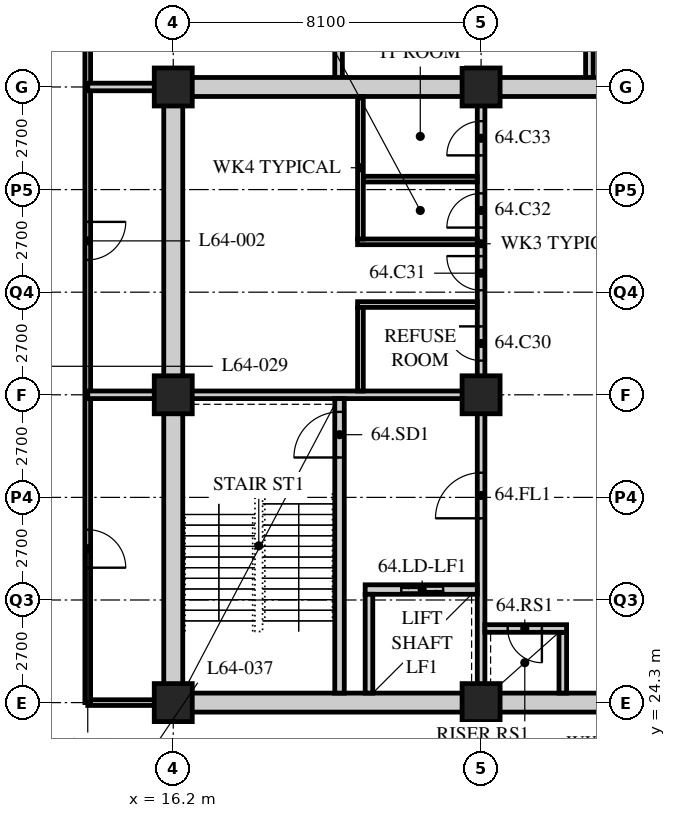
"""IFC4 building model, lengths in metres.
Left out: names, types, materials, properties, quantities, classifications, styles, units other than length and angle.
Written with IfcOpenShell. Run it as: python <this file> out.ifc"""

import sys

from ifc_helpers import new_model, si_unit, direction, frame, frame_2d, origin, origin_2d, place, context, subcontext, project, spatial, rectangle, hollow_rectangle, extrude, element, fill, save


model = new_model("IFC4")
c1 = context("Model", 3, precision=1e-05, world=origin(), true_north=direction((0.0, 1.0)))
c2 = subcontext(c1, "Body", "Model", "MODEL_VIEW")
j1 = project(units=[si_unit("LENGTHUNIT", "METRE"), si_unit("PLANEANGLEUNIT", "RADIAN")], contexts=[c1])
p1 = place(None, origin())
s1 = spatial("IfcSite", under=j1, at=p1, CompositionType="ELEMENT")
p2 = place(p1, origin())
s2 = spatial("IfcBuilding", under=s1, at=p2, CompositionType="ELEMENT")
p3 = place(p2, frame((0.0, 0.0, 250.2)))
s3 = spatial("IfcBuildingStorey", under=s2, at=p3, CompositionType="ELEMENT", Elevation=250.2)
for number, where, z_axis, x_axis in (
    (1, (16.2, 24.3, 0.0), (0.0, 0.0, 1.0), (1.0, 0.0, 0.0)),
    (2, (16.2, 32.4, 0.0), (0.0, 0.0, 1.0), (1.0, 0.0, 0.0)),
    (3, (16.2, 40.5, 0.0), (0.0, 0.0, 1.0), (1.0, 0.0, 0.0)),
    (4, (24.3, 24.3, 0.0), (0.0, 0.0, 1.0), (1.0, 0.0, 0.0)),
    (5, (24.3, 32.4, 0.0), (0.0, 0.0, 1.0), (1.0, 0.0, 0.0)),
    (6, (24.3, 40.5, 0.0), (0.0, 0.0, 1.0), (1.0, 0.0, 0.0)),
):
    element("IfcColumn", number, at=place(p3, frame(where, z_axis=z_axis, x_axis=x_axis)), inside=s3, PredefinedType="COLUMN", context=c2, shape_type="SweptSolid", body=[
        extrude(hollow_rectangle(XDim=1.0, YDim=1.0, WallThickness=0.1, at=origin_2d()), origin(), (0.0, 0.0, 1.0), 3.9),
    ])
p4 = place(p3, frame((16.0, 24.3, 0.0), z_axis=(0.0, 0.0, 1.0), x_axis=(-1.0, 0.0, 0.0)))
e7 = element("IfcWall", 7, at=p4, inside=s3, PredefinedType="PARTITIONING", context=c2, shape_type="SweptSolid", body=[
    extrude(rectangle(XDim=2.05, YDim=0.15, at=frame_2d((1.025, 0.0))), origin(), (0.0, 0.0, 1.0), 3.078),
])
p5 = place(p3, frame((13.95, 24.3, 0.0), z_axis=(0.0, 0.0, 1.0), x_axis=(0.0, 1.0, 0.0)))
e8 = element("IfcWall", 8, at=p5, inside=s3, PredefinedType="PARTITIONING", context=c2, shape_type="SweptSolid", body=[
    extrude(rectangle(XDim=26.55, YDim=0.15, at=frame_2d((13.275, 0.0))), origin(), (0.0, 0.0, 1.0), 3.69),
])
p6 = place(p5, frame((3.55, 0.0, 0.0)))
e9 = element("IfcOpeningElement", 9, at=p6, cuts=e8, PredefinedType="OPENING", context=c2, shape_type="SweptSolid", body=[
    extrude(rectangle(XDim=1.0, YDim=2.1, at=frame_2d((0.5, 1.05))), frame((0.0, 0.085, 0.0), z_axis=(0.0, -1.0, 0.0), x_axis=(1.0, 0.0, 0.0)), (0.0, 0.0, 1.0), 0.17),
])
p7 = place(p5, frame((11.65, 0.0, 0.0)))
e10 = element("IfcOpeningElement", 10, at=p7, cuts=e8, PredefinedType="OPENING", context=c2, shape_type="SweptSolid", body=[
    extrude(rectangle(XDim=1.0, YDim=2.1, at=frame_2d((0.5, 1.05))), frame((0.0, 0.085, 0.0), z_axis=(0.0, -1.0, 0.0), x_axis=(1.0, 0.0, 0.0)), (0.0, 0.0, 1.0), 0.17),
])
p8 = place(p3, frame((13.95, 32.4, 0.0), z_axis=(0.0, 0.0, 1.0), x_axis=(1.0, 0.0, 0.0)))
e11 = element("IfcWall", 11, at=p8, inside=s3, PredefinedType="SOLIDWALL", context=c2, shape_type="SweptSolid", body=[
    extrude(rectangle(XDim=2.25, YDim=0.2, at=frame_2d((1.125, 0.0))), origin(), (0.0, 0.0, 1.0), 3.078),
])
for number, where, z_axis, x_axis in (
    (12, (20.55, 50.85, 0.0), (0.0, 0.0, 1.0), (0.0, -1.0, 0.0)),
    (13, (27.15, 40.5, 0.0), (0.0, 0.0, 1.0), (0.0, 1.0, 0.0)),
):
    element("IfcWall", number, at=place(p3, frame(where, z_axis=z_axis, x_axis=x_axis)), inside=s3, PredefinedType="SOLIDWALL", context=c2, shape_type="SweptSolid", body=[
        extrude(rectangle(XDim=10.35, YDim=0.2, at=frame_2d((5.175, 0.0))), origin(), (0.0, 0.0, 1.0), 3.69),
    ])
p9 = place(p3, frame((13.95, 40.5, 0.0), z_axis=(0.0, 0.0, 1.0), x_axis=(1.0, 0.0, 0.0)))
e14 = element("IfcWall", 14, at=p9, inside=s3, PredefinedType="SOLIDWALL", context=c2, shape_type="SweptSolid", body=[
    extrude(rectangle(XDim=2.25, YDim=0.2, at=frame_2d((1.125, 0.0))), origin(), (0.0, 0.0, 1.0), 3.078),
])
p10 = place(p3, frame((15.95, 24.3, 0.0), z_axis=(0.0, 0.0, 1.0), x_axis=(1.0, 0.0, 0.0)))
e15 = element("IfcWall", 15, at=p10, inside=s3, PredefinedType="SOLIDWALL", context=c2, shape_type="SweptSolid", body=[
    extrude(rectangle(XDim=24.55, YDim=0.5, at=frame_2d((12.275, 0.0))), origin(), (0.0, 0.0, 1.0), 3.04),
])
p11 = place(p10, frame((11.5, 0.0, 0.0)))
e16 = element("IfcOpeningElement", 16, at=p11, cuts=e15, PredefinedType="OPENING", context=c2, shape_type="SweptSolid", body=[
    extrude(rectangle(XDim=1.8, YDim=2.4, at=frame_2d((0.9, 1.2))), frame((0.0, 0.26, 0.0), z_axis=(0.0, -1.0, 0.0), x_axis=(1.0, 0.0, 0.0)), (0.0, 0.0, 1.0), 0.52),
])
p12 = place(p3, frame((15.95, 40.5, 0.0), z_axis=(0.0, 0.0, 1.0), x_axis=(1.0, 0.0, 0.0)))
e17 = element("IfcWall", 17, at=p12, inside=s3, PredefinedType="SOLIDWALL", context=c2, shape_type="SweptSolid", body=[
    extrude(rectangle(XDim=24.55, YDim=0.5, at=frame_2d((12.275, 0.0))), origin(), (0.0, 0.0, 1.0), 3.04),
])
p13 = place(p12, frame((11.5, 0.0, 0.0)))
e18 = element("IfcOpeningElement", 18, at=p13, cuts=e17, PredefinedType="OPENING", context=c2, shape_type="SweptSolid", body=[
    extrude(rectangle(XDim=1.8, YDim=2.4, at=frame_2d((0.9, 1.2))), frame((0.0, 0.26, 0.0), z_axis=(0.0, -1.0, 0.0), x_axis=(1.0, 0.0, 0.0)), (0.0, 0.0, 1.0), 0.52),
])
p14 = place(p3, frame((16.2, 24.55, 0.0), z_axis=(0.0, 0.0, 1.0), x_axis=(0.0, 1.0, 0.0)))
e19 = element("IfcWall", 19, at=p14, inside=s3, PredefinedType="SOLIDWALL", context=c2, shape_type="SweptSolid", body=[
    extrude(rectangle(XDim=15.7, YDim=0.5, at=frame_2d((7.85, 0.0))), origin(), (0.0, 0.0, 1.0), 3.078),
])
p15 = place(p3, frame((16.45, 32.4, 0.0), z_axis=(0.0, 0.0, 1.0), x_axis=(1.0, 0.0, 0.0)))
e20 = element("IfcWall", 20, at=p15, inside=s3, PredefinedType="SOLIDWALL", context=c2, shape_type="SweptSolid", body=[
    extrude(rectangle(XDim=7.95, YDim=0.2, at=frame_2d((3.975, 0.0))), origin(), (0.0, 0.0, 1.0), 3.078),
])
p16 = place(p3, frame((24.3, 24.55, 0.0), z_axis=(0.0, 0.0, 1.0), x_axis=(0.0, 1.0, 0.0)))
e21 = element("IfcWall", 21, at=p16, inside=s3, PredefinedType="SOLIDWALL", context=c2, shape_type="SweptSolid", body=[
    extrude(rectangle(XDim=7.75, YDim=0.2, at=frame_2d((3.875, 0.0))), origin(), (0.0, 0.0, 1.0), 3.078),
])
p17 = place(p16, frame((4.6, 0.0, 0.0)))
e22 = element("IfcOpeningElement", 22, at=p17, cuts=e21, PredefinedType="OPENING", context=c2, shape_type="SweptSolid", body=[
    extrude(rectangle(XDim=1.2, YDim=2.1, at=frame_2d((0.6, 1.05))), frame((0.0, 0.11, 0.0), z_axis=(0.0, -1.0, 0.0), x_axis=(1.0, 0.0, 0.0)), (0.0, 0.0, 1.0), 0.22),
])
p18 = place(p3, frame((20.575, 24.55, 0.0), z_axis=(0.0, 0.0, 1.0), x_axis=(0.0, 1.0, 0.0)))
e23 = element("IfcWall", 23, at=p18, inside=s3, PredefinedType="SOLIDWALL", context=c2, shape_type="SweptSolid", body=[
    extrude(rectangle(XDim=7.75, YDim=0.25, at=frame_2d((3.875, 0.0))), origin(), (0.0, 0.0, 1.0), 3.69),
])
p19 = place(p18, frame((6.2, 0.0, 0.0)))
e24 = element("IfcOpeningElement", 24, at=p19, cuts=e23, PredefinedType="OPENING", context=c2, shape_type="SweptSolid", body=[
    extrude(rectangle(XDim=1.2, YDim=2.1, at=frame_2d((0.6, 1.05))), frame((0.0, 0.135, 0.0), z_axis=(0.0, -1.0, 0.0), x_axis=(1.0, 0.0, 0.0)), (0.0, 0.0, 1.0), 0.27),
])
p20 = place(p3, frame((21.25, 27.275, 0.0), z_axis=(0.0, 0.0, 1.0), x_axis=(1.0, 0.0, 0.0)))
e25 = element("IfcWall", 25, at=p20, inside=s3, PredefinedType="SOLIDWALL", context=c2, shape_type="SweptSolid", body=[
    extrude(rectangle(XDim=2.95, YDim=0.25, at=frame_2d((1.475, 0.0))), origin(), (0.0, 0.0, 1.0), 3.69),
])
p21 = place(p20, frame((0.95, 0.0, 0.0)))
e26 = element("IfcOpeningElement", 26, at=p21, cuts=e25, PredefinedType="OPENING", context=c2, shape_type="SweptSolid", body=[
    extrude(rectangle(XDim=1.1, YDim=2.4, at=frame_2d((0.55, 1.2))), frame((0.0, 0.135, 0.0), z_axis=(0.0, -1.0, 0.0), x_axis=(1.0, 0.0, 0.0)), (0.0, 0.0, 1.0), 0.27),
])
p22 = place(p3, frame((21.35, 24.55, 0.0), z_axis=(0.0, 0.0, 1.0), x_axis=(0.0, 1.0, 0.0)))
e27 = element("IfcWall", 27, at=p22, inside=s3, PredefinedType="SOLIDWALL", context=c2, shape_type="SweptSolid", body=[
    extrude(rectangle(XDim=2.6, YDim=0.2, at=frame_2d((1.3, 0.0))), origin(), (0.0, 0.0, 1.0), 3.69),
])
p23 = place(p3, frame((26.45, 24.55, 0.0), z_axis=(0.0, 0.0, 1.0), x_axis=(0.0, 1.0, 0.0)))
e28 = element("IfcWall", 28, at=p23, inside=s3, PredefinedType="SOLIDWALL", context=c2, shape_type="SweptSolid", body=[
    extrude(rectangle(XDim=1.6, YDim=0.2, at=frame_2d((0.8, 0.0))), origin(), (0.0, 0.0, 1.0), 3.69),
])
p24 = place(p3, frame((24.4, 26.25, 0.0), z_axis=(0.0, 0.0, 1.0), x_axis=(1.0, 0.0, 0.0)))
e29 = element("IfcWall", 29, at=p24, inside=s3, PredefinedType="SOLIDWALL", context=c2, shape_type="SweptSolid", body=[
    extrude(rectangle(XDim=2.15, YDim=0.2, at=frame_2d((1.075, 0.0))), origin(), (0.0, 0.0, 1.0), 3.69),
])
p25 = place(p24, frame((0.6, 0.0, 0.0)))
e30 = element("IfcOpeningElement", 30, at=p25, cuts=e29, PredefinedType="OPENING", context=c2, shape_type="SweptSolid", body=[
    extrude(rectangle(XDim=0.9, YDim=2.1, at=frame_2d((0.45, 1.05))), frame((0.0, 0.11, 0.0), z_axis=(0.0, -1.0, 0.0), x_axis=(1.0, 0.0, 0.0)), (0.0, 0.0, 1.0), 0.22),
])
p26 = place(p3, frame((24.3, 32.5, 0.0), z_axis=(0.0, 0.0, 1.0), x_axis=(0.0, 1.0, 0.0)))
e31 = element("IfcWall", 31, at=p26, inside=s3, PredefinedType="PARTITIONING", context=c2, shape_type="SweptSolid", body=[
    extrude(rectangle(XDim=7.75, YDim=0.2, at=frame_2d((3.875, 0.0))), origin(), (0.0, 0.0, 1.0), 3.078),
])
p27 = place(p26, frame((0.8, 0.0, 0.0)))
e32 = element("IfcOpeningElement", 32, at=p27, cuts=e31, PredefinedType="OPENING", context=c2, shape_type="SweptSolid", body=[
    extrude(rectangle(XDim=0.9, YDim=2.1, at=frame_2d((0.45, 1.05))), frame((0.0, 0.11, 0.0), z_axis=(0.0, -1.0, 0.0), x_axis=(1.0, 0.0, 0.0)), (0.0, 0.0, 1.0), 0.22),
])
p28 = place(p26, frame((2.65, 0.0, 0.0)))
e33 = element("IfcOpeningElement", 33, at=p28, cuts=e31, PredefinedType="OPENING", context=c2, shape_type="SweptSolid", body=[
    extrude(rectangle(XDim=0.9, YDim=2.1, at=frame_2d((0.45, 1.05))), frame((0.0, 0.11, 0.0), z_axis=(0.0, -1.0, 0.0), x_axis=(1.0, 0.0, 0.0)), (0.0, 0.0, 1.0), 0.22),
])
p29 = place(p26, frame((4.3, 0.0, 0.0)))
e34 = element("IfcOpeningElement", 34, at=p29, cuts=e31, PredefinedType="OPENING", context=c2, shape_type="SweptSolid", body=[
    extrude(rectangle(XDim=0.9, YDim=2.1, at=frame_2d((0.45, 1.05))), frame((0.0, 0.11, 0.0), z_axis=(0.0, -1.0, 0.0), x_axis=(1.0, 0.0, 0.0)), (0.0, 0.0, 1.0), 0.22),
])
p30 = place(p26, frame((6.2, 0.0, 0.0)))
e35 = element("IfcOpeningElement", 35, at=p30, cuts=e31, PredefinedType="OPENING", context=c2, shape_type="SweptSolid", body=[
    extrude(rectangle(XDim=0.9, YDim=2.1, at=frame_2d((0.45, 1.05))), frame((0.0, 0.11, 0.0), z_axis=(0.0, -1.0, 0.0), x_axis=(1.0, 0.0, 0.0)), (0.0, 0.0, 1.0), 0.22),
])
for number, where, z_axis, x_axis in (
    (36, (21.05, 34.775, 0.0), (0.0, 0.0, 1.0), (1.0, 0.0, 0.0)),
    (37, (21.05, 36.425, 0.0), (0.0, 0.0, 1.0), (1.0, 0.0, 0.0)),
):
    element("IfcWall", number, at=place(p3, frame(where, z_axis=z_axis, x_axis=x_axis)), inside=s3, PredefinedType="PARTITIONING", context=c2, shape_type="SweptSolid", body=[
        extrude(rectangle(XDim=3.15, YDim=0.15, at=frame_2d((1.575, 0.0))), origin(), (0.0, 0.0, 1.0), 3.69),
    ])
p31 = place(p3, frame((21.2, 38.075, 0.0), z_axis=(0.0, 0.0, 1.0), x_axis=(1.0, 0.0, 0.0)))
e38 = element("IfcWall", 38, at=p31, inside=s3, PredefinedType="PARTITIONING", context=c2, shape_type="SweptSolid", body=[
    extrude(rectangle(XDim=3.0, YDim=0.15, at=frame_2d((1.5, 0.0))), origin(), (0.0, 0.0, 1.0), 3.69),
])
p32 = place(p3, frame((21.125, 32.5, 0.0), z_axis=(0.0, 0.0, 1.0), x_axis=(0.0, 1.0, 0.0)))
e39 = element("IfcWall", 39, at=p32, inside=s3, PredefinedType="PARTITIONING", context=c2, shape_type="SweptSolid", body=[
    extrude(rectangle(XDim=2.2, YDim=0.15, at=frame_2d((1.1, 0.0))), origin(), (0.0, 0.0, 1.0), 3.69),
])
p33 = place(p3, frame((21.125, 36.5, 0.0), z_axis=(0.0, 0.0, 1.0), x_axis=(0.0, 1.0, 0.0)))
e40 = element("IfcWall", 40, at=p33, inside=s3, PredefinedType="PARTITIONING", context=c2, shape_type="SweptSolid", body=[
    extrude(rectangle(XDim=3.75, YDim=0.15, at=frame_2d((1.875, 0.0))), origin(), (0.0, 0.0, 1.0), 3.69),
])
p34 = place(p6, origin())
e41 = element("IfcDoor", 41, at=p34, inside=s3, OperationType="SINGLE_SWING_RIGHT", PredefinedType="DOOR", context=c2, shape_type="SweptSolid", body=[
    extrude(rectangle(XDim=1.0, YDim=2.1, at=frame_2d((0.5, 1.05))), frame((0.0, 0.025, 0.0), z_axis=(0.0, -1.0, 0.0), x_axis=(1.0, 0.0, 0.0)), (0.0, 0.0, 1.0), 0.05),
])
fill(e9, e41)
p35 = place(p7, origin())
e42 = element("IfcDoor", 42, at=p35, inside=s3, OperationType="SINGLE_SWING_LEFT", PredefinedType="DOOR", context=c2, shape_type="SweptSolid", body=[
    extrude(rectangle(XDim=1.0, YDim=2.1, at=frame_2d((0.5, 1.05))), frame((0.0, 0.025, 0.0), z_axis=(0.0, -1.0, 0.0), x_axis=(1.0, 0.0, 0.0)), (0.0, 0.0, 1.0), 0.05),
])
fill(e10, e42)
p36 = place(p27, origin())
e43 = element("IfcDoor", 43, at=p36, inside=s3, OperationType="SINGLE_SWING_RIGHT", PredefinedType="DOOR", context=c2, shape_type="SweptSolid", body=[
    extrude(rectangle(XDim=0.9, YDim=2.1, at=frame_2d((0.45, 1.05))), frame((0.0, 0.025, 0.0), z_axis=(0.0, -1.0, 0.0), x_axis=(1.0, 0.0, 0.0)), (0.0, 0.0, 1.0), 0.05),
])
fill(e32, e43)
p37 = place(p28, origin())
e44 = element("IfcDoor", 44, at=p37, inside=s3, OperationType="SINGLE_SWING_RIGHT", PredefinedType="DOOR", context=c2, shape_type="SweptSolid", body=[
    extrude(rectangle(XDim=0.9, YDim=2.1, at=frame_2d((0.45, 1.05))), frame((0.0, 0.025, 0.0), z_axis=(0.0, -1.0, 0.0), x_axis=(1.0, 0.0, 0.0)), (0.0, 0.0, 1.0), 0.05),
])
fill(e33, e44)
p38 = place(p29, origin())
e45 = element("IfcDoor", 45, at=p38, inside=s3, OperationType="SINGLE_SWING_LEFT", PredefinedType="DOOR", context=c2, shape_type="SweptSolid", body=[
    extrude(rectangle(XDim=0.9, YDim=2.1, at=frame_2d((0.45, 1.05))), frame((0.0, 0.025, 0.0), z_axis=(0.0, -1.0, 0.0), x_axis=(1.0, 0.0, 0.0)), (0.0, 0.0, 1.0), 0.05),
])
fill(e34, e45)
p39 = place(p30, origin())
e46 = element("IfcDoor", 46, at=p39, inside=s3, OperationType="SINGLE_SWING_LEFT", PredefinedType="DOOR", context=c2, shape_type="SweptSolid", body=[
    extrude(rectangle(XDim=0.9, YDim=2.1, at=frame_2d((0.45, 1.05))), frame((0.0, 0.025, 0.0), z_axis=(0.0, -1.0, 0.0), x_axis=(1.0, 0.0, 0.0)), (0.0, 0.0, 1.0), 0.05),
])
fill(e35, e46)
p40 = place(p19, origin())
e47 = element("IfcDoor", 47, at=p40, inside=s3, OperationType="SINGLE_SWING_LEFT", PredefinedType="DOOR", context=c2, shape_type="SweptSolid", body=[
    extrude(rectangle(XDim=1.2, YDim=2.1, at=frame_2d((0.6, 1.05))), frame((0.0, 0.025, 0.0), z_axis=(0.0, -1.0, 0.0), x_axis=(1.0, 0.0, 0.0)), (0.0, 0.0, 1.0), 0.05),
])
fill(e24, e47)
p41 = place(p17, origin())
e48 = element("IfcDoor", 48, at=p41, inside=s3, OperationType="SINGLE_SWING_LEFT", PredefinedType="DOOR", context=c2, shape_type="SweptSolid", body=[
    extrude(rectangle(XDim=1.2, YDim=2.1, at=frame_2d((0.6, 1.05))), frame((0.0, 0.025, 0.0), z_axis=(0.0, -1.0, 0.0), x_axis=(1.0, 0.0, 0.0)), (0.0, 0.0, 1.0), 0.05),
])
fill(e22, e48)
p42 = place(p25, origin())
e49 = element("IfcDoor", 49, at=p42, inside=s3, OperationType="SINGLE_SWING_LEFT", PredefinedType="DOOR", context=c2, shape_type="SweptSolid", body=[
    extrude(rectangle(XDim=0.9, YDim=2.1, at=frame_2d((0.45, 1.05))), frame((0.0, 0.025, 0.0), z_axis=(0.0, -1.0, 0.0), x_axis=(1.0, 0.0, 0.0)), (0.0, 0.0, 1.0), 0.05),
])
fill(e30, e49)
p43 = place(p21, origin())
e50 = element("IfcDoor", 50, at=p43, inside=s3, OperationType="DOUBLE_DOOR_SLIDING", PredefinedType="DOOR", context=c2, shape_type="SweptSolid", body=[
    extrude(rectangle(XDim=1.1, YDim=2.4, at=frame_2d((0.55, 1.2))), frame((0.0, 0.025, 0.0), z_axis=(0.0, -1.0, 0.0), x_axis=(1.0, 0.0, 0.0)), (0.0, 0.0, 1.0), 0.05),
])
fill(e26, e50)
save(model, sys.argv[1])
